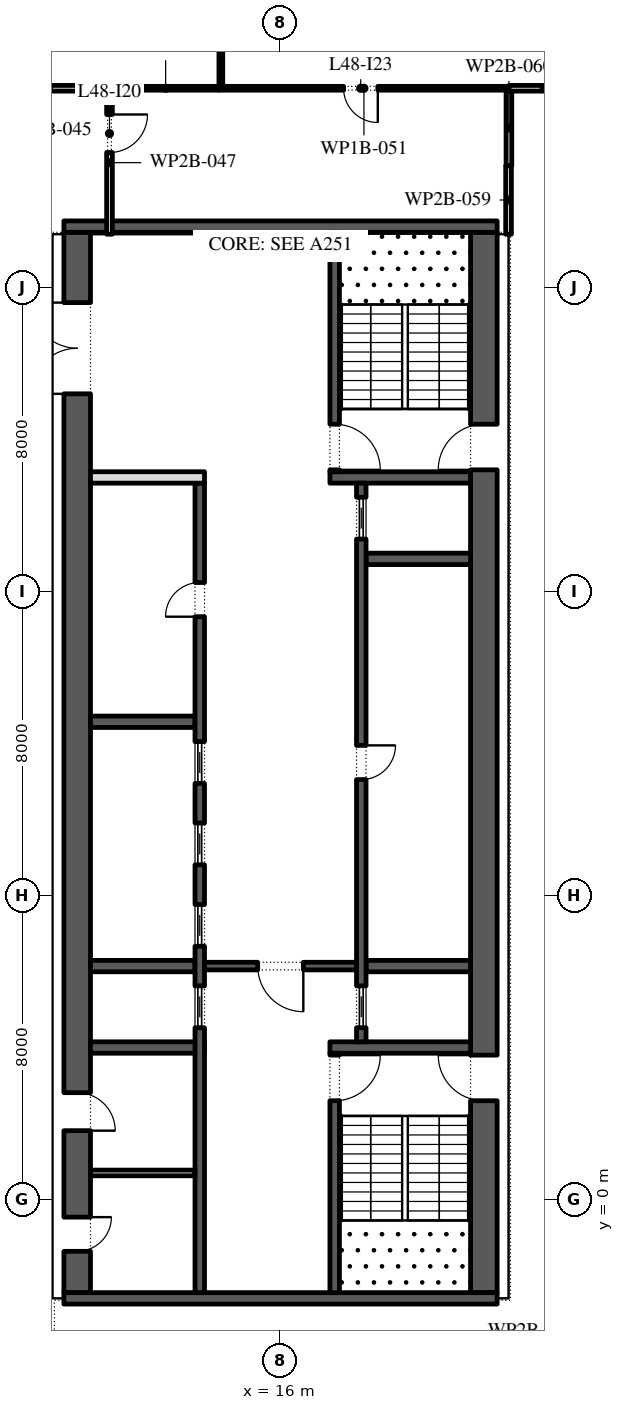
"""IFC4 building model, lengths in metres.
Left out: names, types, materials, properties, quantities, classifications, styles, units other than length and angle.
Written with IfcOpenShell. Run it as: python <this file> out.ifc"""

import sys

from ifc_helpers import new_model, si_unit, direction, frame, frame_2d, origin, place, context, subcontext, project, spatial, rectangle, extrude, element, fill, save


model = new_model("IFC4")
c1 = context("Model", 3, precision=1e-05, world=origin(), true_north=direction((0.0, 1.0)))
c2 = subcontext(c1, "Body", "Model", "MODEL_VIEW")
j1 = project(units=[si_unit("LENGTHUNIT", "METRE"), si_unit("PLANEANGLEUNIT", "RADIAN")], contexts=[c1])
p1 = place(None, origin())
s1 = spatial("IfcSite", under=j1, at=p1, CompositionType="ELEMENT")
p2 = place(p1, origin())
s2 = spatial("IfcBuilding", under=s1, at=p2, CompositionType="ELEMENT")
p3 = place(p2, frame((0.0, 0.0, 217.8)))
s3 = spatial("IfcBuildingStorey", under=s2, at=p3, CompositionType="ELEMENT", Elevation=217.8)
p4 = place(p3, frame((21.35, -2.45, 0.0), z_axis=(0.0, 0.0, 1.0), x_axis=(0.0, 1.0, 0.0)))
e1 = element("IfcWall", 1, at=p4, inside=s3, PredefinedType="SHEAR", context=c2, shape_type="SweptSolid", body=[
    extrude(rectangle(XDim=27.9, YDim=0.7, at=frame_2d((13.95, 0.0))), origin(), (0.0, 0.0, 1.0), 3.95),
])
p5 = place(p4, frame((5.05, 0.0, 0.0)))
e2 = element("IfcOpeningElement", 2, at=p5, cuts=e1, PredefinedType="OPENING", context=c2, shape_type="SweptSolid", body=[
    extrude(rectangle(XDim=1.2, YDim=2.1, at=frame_2d((0.6, 1.05))), frame((0.0, 0.36, 0.0), z_axis=(0.0, -1.0, 0.0), x_axis=(1.0, 0.0, 0.0)), (0.0, 0.0, 1.0), 0.72),
])
p6 = place(p4, frame((21.65, 0.0, 0.0)))
e3 = element("IfcOpeningElement", 3, at=p6, cuts=e1, PredefinedType="OPENING", context=c2, shape_type="SweptSolid", body=[
    extrude(rectangle(XDim=1.2, YDim=2.1, at=frame_2d((0.6, 1.05))), frame((0.0, 0.36, 0.0), z_axis=(0.0, -1.0, 0.0), x_axis=(1.0, 0.0, 0.0)), (0.0, 0.0, 1.0), 0.72),
])
p7 = place(p3, frame((10.65, -2.45, 0.0), z_axis=(0.0, 0.0, 1.0), x_axis=(0.0, 1.0, 0.0)))
e4 = element("IfcWall", 4, at=p7, inside=s3, PredefinedType="SHEAR", context=c2, shape_type="SweptSolid", body=[
    extrude(rectangle(XDim=27.9, YDim=0.7, at=frame_2d((13.95, 0.0))), origin(), (0.0, 0.0, 1.0), 3.95),
])
p8 = place(p7, frame((23.65, 0.0, 0.0)))
e5 = element("IfcOpeningElement", 5, at=p8, cuts=e4, PredefinedType="OPENING", context=c2, shape_type="SweptSolid", body=[
    extrude(rectangle(XDim=2.4, YDim=2.1, at=frame_2d((1.2, 1.05))), frame((0.0, 0.36, 0.0), z_axis=(0.0, -1.0, 0.0), x_axis=(1.0, 0.0, 0.0)), (0.0, 0.0, 1.0), 0.72),
])
p9 = place(p7, frame((1.087, 0.0, 0.0)))
e6 = element("IfcOpeningElement", 6, at=p9, cuts=e4, PredefinedType="OPENING", context=c2, shape_type="SweptSolid", body=[
    extrude(rectangle(XDim=0.9, YDim=2.1, at=frame_2d((0.45, 1.05))), frame((0.0, 0.36, 0.0), z_axis=(0.0, -1.0, 0.0), x_axis=(1.0, 0.0, 0.0)), (0.0, 0.0, 1.0), 0.72),
])
p10 = place(p7, frame((4.262, 0.0, 0.0)))
e7 = element("IfcOpeningElement", 7, at=p10, cuts=e4, PredefinedType="OPENING", context=c2, shape_type="SweptSolid", body=[
    extrude(rectangle(XDim=1.0, YDim=2.1, at=frame_2d((0.5, 1.05))), frame((0.0, 0.36, 0.0), z_axis=(0.0, -1.0, 0.0), x_axis=(1.0, 0.0, 0.0)), (0.0, 0.0, 1.0), 0.72),
])
for number, where, z_axis, x_axis in (
    (8, (10.3, -2.6, 0.0), (0.0, 0.0, 1.0), (1.0, 0.0, 0.0)),
    (9, (10.3, 25.6, 0.0), (0.0, 0.0, 1.0), (1.0, 0.0, 0.0)),
):
    element("IfcWall", number, at=place(p3, frame(where, z_axis=z_axis, x_axis=x_axis)), inside=s3, PredefinedType="SHEAR", context=c2, shape_type="SweptSolid", body=[
        extrude(rectangle(XDim=11.4, YDim=0.3, at=frame_2d((5.7, 0.0))), origin(), (0.0, 0.0, 1.0), 3.95),
    ])
p11 = place(p3, frame((17.3, 4.0, 0.0), z_axis=(0.0, 0.0, 1.0), x_axis=(1.0, 0.0, 0.0)))
e10 = element("IfcWall", 10, at=p11, inside=s3, PredefinedType="SHEAR", context=c2, shape_type="SweptSolid", body=[
    extrude(rectangle(XDim=3.7, YDim=0.3, at=frame_2d((1.85, 0.0))), origin(), (0.0, 0.0, 1.0), 3.95),
])
p12 = place(p3, frame((17.425, -2.45, 0.0), z_axis=(0.0, 0.0, 1.0), x_axis=(0.0, 1.0, 0.0)))
e11 = element("IfcWall", 11, at=p12, inside=s3, PredefinedType="SHEAR", context=c2, shape_type="SweptSolid", body=[
    extrude(rectangle(XDim=6.3, YDim=0.25, at=frame_2d((3.15, 0.0))), origin(), (0.0, 0.0, 1.0), 3.95),
])
p13 = place(p12, frame((5.05, 0.0, 0.0)))
e12 = element("IfcOpeningElement", 12, at=p13, cuts=e11, PredefinedType="OPENING", context=c2, shape_type="SweptSolid", body=[
    extrude(rectangle(XDim=1.2, YDim=2.1, at=frame_2d((0.6, 1.05))), frame((0.0, 0.135, 0.0), z_axis=(0.0, -1.0, 0.0), x_axis=(1.0, 0.0, 0.0)), (0.0, 0.0, 1.0), 0.27),
])
p14 = place(p3, frame((17.3, 19.0, 0.0), z_axis=(0.0, 0.0, 1.0), x_axis=(1.0, 0.0, 0.0)))
e13 = element("IfcWall", 13, at=p14, inside=s3, PredefinedType="SHEAR", context=c2, shape_type="SweptSolid", body=[
    extrude(rectangle(XDim=3.7, YDim=0.3, at=frame_2d((1.85, 0.0))), origin(), (0.0, 0.0, 1.0), 3.95),
])
p15 = place(p3, frame((17.425, 19.15, 0.0), z_axis=(0.0, 0.0, 1.0), x_axis=(0.0, 1.0, 0.0)))
e14 = element("IfcWall", 14, at=p15, inside=s3, PredefinedType="SHEAR", context=c2, shape_type="SweptSolid", body=[
    extrude(rectangle(XDim=6.3, YDim=0.25, at=frame_2d((3.15, 0.0))), origin(), (0.0, 0.0, 1.0), 3.95),
])
p16 = place(p15, frame((0.05, 0.0, 0.0)))
e15 = element("IfcOpeningElement", 15, at=p16, cuts=e14, PredefinedType="OPENING", context=c2, shape_type="SweptSolid", body=[
    extrude(rectangle(XDim=1.2, YDim=2.1, at=frame_2d((0.6, 1.05))), frame((0.0, 0.135, 0.0), z_axis=(0.0, -1.0, 0.0), x_axis=(1.0, 0.0, 0.0)), (0.0, 0.0, 1.0), 0.27),
])
for number, where, z_axis, x_axis in (
    (16, (18.25, 6.143, 0.0), (0.0, 0.0, 1.0), (1.0, 0.0, 0.0)),
    (17, (18.25, 16.857, 0.0), (0.0, 0.0, 1.0), (1.0, 0.0, 0.0)),
):
    element("IfcWall", number, at=place(p3, frame(where, z_axis=z_axis, x_axis=x_axis)), inside=s3, PredefinedType="SHEAR", context=c2, shape_type="SweptSolid", body=[
        extrude(rectangle(XDim=2.75, YDim=0.3, at=frame_2d((1.375, 0.0))), origin(), (0.0, 0.0, 1.0), 3.95),
    ])
p17 = place(p3, frame((18.125, 4.15, 0.0), z_axis=(0.0, 0.0, 1.0), x_axis=(0.0, 1.0, 0.0)))
e18 = element("IfcWall", 18, at=p17, inside=s3, PredefinedType="SHEAR", context=c2, shape_type="SweptSolid", body=[
    extrude(rectangle(XDim=14.7, YDim=0.25, at=frame_2d((7.35, 0.0))), origin(), (0.0, 0.0, 1.0), 3.95),
])
p18 = place(p17, frame((6.9, 0.0, 0.0)))
e19 = element("IfcOpeningElement", 19, at=p18, cuts=e18, PredefinedType="OPENING", context=c2, shape_type="SweptSolid", body=[
    extrude(rectangle(XDim=0.9, YDim=2.1, at=frame_2d((0.45, 1.05))), frame((0.0, 0.135, 0.0), z_axis=(0.0, -1.0, 0.0), x_axis=(1.0, 0.0, 0.0)), (0.0, 0.0, 1.0), 0.27),
])
p19 = place(p17, frame((0.371, 0.0, 0.0)))
e20 = element("IfcOpeningElement", 20, at=p19, cuts=e18, PredefinedType="OPENING", context=c2, shape_type="SweptSolid", body=[
    extrude(rectangle(XDim=1.1, YDim=2.1, at=frame_2d((0.55, 1.05))), frame((0.0, 0.135, 0.0), z_axis=(0.0, -1.0, 0.0), x_axis=(1.0, 0.0, 0.0)), (0.0, 0.0, 1.0), 0.27),
])
p20 = place(p17, frame((13.229, 0.0, 0.0)))
e21 = element("IfcOpeningElement", 21, at=p20, cuts=e18, PredefinedType="OPENING", context=c2, shape_type="SweptSolid", body=[
    extrude(rectangle(XDim=1.1, YDim=2.1, at=frame_2d((0.55, 1.05))), frame((0.0, 0.135, 0.0), z_axis=(0.0, -1.0, 0.0), x_axis=(1.0, 0.0, 0.0)), (0.0, 0.0, 1.0), 0.27),
])
p21 = place(p3, frame((11.0, 4.0, 0.0), z_axis=(0.0, 0.0, 1.0), x_axis=(1.0, 0.0, 0.0)))
e22 = element("IfcWall", 22, at=p21, inside=s3, PredefinedType="SHEAR", context=c2, shape_type="SweptSolid", body=[
    extrude(rectangle(XDim=3.0, YDim=0.3, at=frame_2d((1.5, 0.0))), origin(), (0.0, 0.0, 1.0), 3.95),
])
for number, where, z_axis, x_axis in (
    (23, (11.0, 6.143, 0.0), (0.0, 0.0, 1.0), (1.0, 0.0, 0.0)),
    (24, (11.0, 12.571, 0.0), (0.0, 0.0, 1.0), (1.0, 0.0, 0.0)),
):
    element("IfcWall", number, at=place(p3, frame(where, z_axis=z_axis, x_axis=x_axis)), inside=s3, PredefinedType="SHEAR", context=c2, shape_type="SweptSolid", body=[
        extrude(rectangle(XDim=2.75, YDim=0.3, at=frame_2d((1.375, 0.0))), origin(), (0.0, 0.0, 1.0), 3.95),
    ])
p22 = place(p3, frame((13.875, -2.45, 0.0), z_axis=(0.0, 0.0, 1.0), x_axis=(0.0, 1.0, 0.0)))
e25 = element("IfcWall", 25, at=p22, inside=s3, PredefinedType="SHEAR", context=c2, shape_type="SweptSolid", body=[
    extrude(rectangle(XDim=21.3, YDim=0.25, at=frame_2d((10.65, 0.0))), origin(), (0.0, 0.0, 1.0), 3.95),
])
p23 = place(p22, frame((17.786, 0.0, 0.0)))
e26 = element("IfcOpeningElement", 26, at=p23, cuts=e25, PredefinedType="OPENING", context=c2, shape_type="SweptSolid", body=[
    extrude(rectangle(XDim=0.9, YDim=2.1, at=frame_2d((0.45, 1.05))), frame((0.0, 0.135, 0.0), z_axis=(0.0, -1.0, 0.0), x_axis=(1.0, 0.0, 0.0)), (0.0, 0.0, 1.0), 0.27),
])
p24 = place(p22, frame((6.971, 0.0, 0.0)))
e27 = element("IfcOpeningElement", 27, at=p24, cuts=e25, PredefinedType="OPENING", context=c2, shape_type="SweptSolid", body=[
    extrude(rectangle(XDim=1.1, YDim=2.1, at=frame_2d((0.55, 1.05))), frame((0.0, 0.135, 0.0), z_axis=(0.0, -1.0, 0.0), x_axis=(1.0, 0.0, 0.0)), (0.0, 0.0, 1.0), 0.27),
])
p25 = place(p22, frame((9.114, 0.0, 0.0)))
e28 = element("IfcOpeningElement", 28, at=p25, cuts=e25, PredefinedType="OPENING", context=c2, shape_type="SweptSolid", body=[
    extrude(rectangle(XDim=1.1, YDim=2.1, at=frame_2d((0.55, 1.05))), frame((0.0, 0.135, 0.0), z_axis=(0.0, -1.0, 0.0), x_axis=(1.0, 0.0, 0.0)), (0.0, 0.0, 1.0), 0.27),
])
p26 = place(p22, frame((11.257, 0.0, 0.0)))
e29 = element("IfcOpeningElement", 29, at=p26, cuts=e25, PredefinedType="OPENING", context=c2, shape_type="SweptSolid", body=[
    extrude(rectangle(XDim=1.1, YDim=2.1, at=frame_2d((0.55, 1.05))), frame((0.0, 0.135, 0.0), z_axis=(0.0, -1.0, 0.0), x_axis=(1.0, 0.0, 0.0)), (0.0, 0.0, 1.0), 0.27),
])
p27 = place(p22, frame((13.4, 0.0, 0.0)))
e30 = element("IfcOpeningElement", 30, at=p27, cuts=e25, PredefinedType="OPENING", context=c2, shape_type="SweptSolid", body=[
    extrude(rectangle(XDim=1.1, YDim=2.1, at=frame_2d((0.55, 1.05))), frame((0.0, 0.135, 0.0), z_axis=(0.0, -1.0, 0.0), x_axis=(1.0, 0.0, 0.0)), (0.0, 0.0, 1.0), 0.27),
])
p28 = place(p3, frame((11.0, 19.0, 0.0), z_axis=(0.0, 0.0, 1.0), x_axis=(1.0, 0.0, 0.0)))
e31 = element("IfcWall", 31, at=p28, inside=s3, PredefinedType="PARTITIONING", context=c2, shape_type="SweptSolid", body=[
    extrude(rectangle(XDim=3.0, YDim=0.3, at=frame_2d((1.5, 0.0))), origin(), (0.0, 0.0, 1.0), 3.95),
])
p29 = place(p3, frame((14.0, 6.143, 0.0), z_axis=(0.0, 0.0, 1.0), x_axis=(1.0, 0.0, 0.0)))
e32 = element("IfcWall", 32, at=p29, inside=s3, PredefinedType="SHEAR", context=c2, shape_type="SweptSolid", body=[
    extrude(rectangle(XDim=4.0, YDim=0.2, at=frame_2d((2.0, 0.0))), origin(), (0.0, 0.0, 1.0), 3.95),
])
p30 = place(p29, frame((1.4, 0.0, 0.0)))
e33 = element("IfcOpeningElement", 33, at=p30, cuts=e32, PredefinedType="OPENING", context=c2, shape_type="SweptSolid", body=[
    extrude(rectangle(XDim=1.2, YDim=2.1, at=frame_2d((0.6, 1.05))), frame((0.0, 0.11, 0.0), z_axis=(0.0, -1.0, 0.0), x_axis=(1.0, 0.0, 0.0)), (0.0, 0.0, 1.0), 0.22),
])
p31 = place(p3, frame((11.0, 0.7, 0.0), z_axis=(0.0, 0.0, 1.0), x_axis=(1.0, 0.0, 0.0)))
e34 = element("IfcWall", 34, at=p31, inside=s3, PredefinedType="PARTITIONING", context=c2, shape_type="SweptSolid", body=[
    extrude(rectangle(XDim=2.75, YDim=0.15, at=frame_2d((1.375, 0.0))), origin(), (0.0, 0.0, 1.0), 3.95),
])
p32 = place(p3, frame((8.21, 29.24, 0.0), z_axis=(0.0, 0.0, 1.0), x_axis=(1.0, 0.0, 0.0)))
e35 = element("IfcWall", 35, at=p32, inside=s3, PredefinedType="PARTITIONING", context=c2, shape_type="SweptSolid", body=[
    extrude(rectangle(XDim=3.365, YDim=0.15, at=frame_2d((1.683, 0.0))), origin(), (0.0, 0.0, 1.0), 3.95),
])
p33 = place(p3, frame((11.5, 29.165, 0.0), z_axis=(0.0, 0.0, 1.0), x_axis=(0.0, -1.0, 0.0)))
e36 = element("IfcWall", 36, at=p33, inside=s3, PredefinedType="PARTITIONING", context=c2, shape_type="SweptSolid", body=[
    extrude(rectangle(XDim=3.765, YDim=0.15, at=frame_2d((1.883, 0.0))), origin(), (0.0, 0.0, 1.0), 3.95),
])
p34 = place(p33, frame((0.615, 0.0, 0.0)))
e37 = element("IfcOpeningElement", 37, at=p34, cuts=e36, PredefinedType="OPENING", context=c2, shape_type="SweptSolid", body=[
    extrude(rectangle(XDim=1.0, YDim=2.1, at=frame_2d((0.5, 1.05))), frame((0.0, 0.085, 0.0), z_axis=(0.0, -1.0, 0.0), x_axis=(1.0, 0.0, 0.0)), (0.0, 0.0, 1.0), 0.17),
])
p35 = place(p3, frame((11.575, 29.24, 0.0), z_axis=(0.0, 0.0, 1.0), x_axis=(1.0, 0.0, 0.0)))
e38 = element("IfcWall", 38, at=p35, inside=s3, PredefinedType="PARTITIONING", context=c2, shape_type="SweptSolid", body=[
    extrude(rectangle(XDim=2.805, YDim=0.1, at=frame_2d((1.402, 0.0))), origin(), (0.0, 0.0, 1.0), 3.95),
])
p36 = place(p3, frame((14.38, 29.24, 0.0), z_axis=(0.0, 0.0, 1.0), x_axis=(1.0, 0.0, 0.0)))
e39 = element("IfcWall", 39, at=p36, inside=s3, PredefinedType="PARTITIONING", context=c2, shape_type="SweptSolid", body=[
    extrude(rectangle(XDim=7.63, YDim=0.1, at=frame_2d((3.815, 0.0))), origin(), (0.0, 0.0, 1.0), 3.95),
])
p37 = place(p36, frame((3.28, 0.0, 0.0)))
e40 = element("IfcOpeningElement", 40, at=p37, cuts=e39, PredefinedType="OPENING", context=c2, shape_type="SweptSolid", body=[
    extrude(rectangle(XDim=0.9, YDim=2.1, at=frame_2d((0.45, 1.05))), frame((0.0, 0.06, 0.0), z_axis=(0.0, -1.0, 0.0), x_axis=(1.0, 0.0, 0.0)), (0.0, 0.0, 1.0), 0.12),
])
p38 = place(p3, frame((14.43, 36.22, 0.0), z_axis=(0.0, 0.0, 1.0), x_axis=(0.0, -1.0, 0.0)))
e41 = element("IfcWall", 41, at=p38, inside=s3, PredefinedType="PARTITIONING", context=c2, shape_type="SweptSolid", body=[
    extrude(rectangle(XDim=6.93, YDim=0.1, at=frame_2d((3.465, 0.0))), origin(), (0.0, 0.0, 1.0), 3.95),
])
p39 = place(p3, frame((22.0, 25.4, 0.0), z_axis=(0.0, 0.0, 1.0), x_axis=(0.0, 1.0, 0.0)))
e42 = element("IfcWall", 42, at=p39, inside=s3, PredefinedType="PARTITIONING", context=c2, shape_type="SweptSolid", body=[
    extrude(rectangle(XDim=1.8, YDim=0.15, at=frame_2d((0.9, 0.0))), origin(), (0.0, 0.0, 1.0), 3.95),
])
p40 = place(p3, frame((22.01, 27.2, 0.0), z_axis=(0.0, 0.0, 1.0), x_axis=(0.0, 1.0, 0.0)))
e43 = element("IfcWall", 43, at=p40, inside=s3, PredefinedType="PARTITIONING", context=c2, shape_type="SweptSolid", body=[
    extrude(rectangle(XDim=1.99, YDim=0.15, at=frame_2d((0.995, 0.0))), origin(), (0.0, 0.0, 1.0), 3.95),
])
p41 = place(p3, frame((22.01, 29.24, 0.0), z_axis=(0.0, 0.0, 1.0), x_axis=(1.0, 0.0, 0.0)))
e44 = element("IfcWall", 44, at=p41, inside=s3, PredefinedType="PARTITIONING", context=c2, shape_type="SweptSolid", body=[
    extrude(rectangle(XDim=1.855, YDim=0.15, at=frame_2d((0.927, 0.0))), origin(), (0.0, 0.0, 1.0), 3.95),
])
p42 = place(p18, frame((0.9, -0.2, 0.0), z_axis=(0.0, 0.0, 1.0), x_axis=(-1.0, 0.0, 0.0)))
e45 = element("IfcDoor", 45, at=p42, inside=s3, OperationType="SINGLE_SWING_RIGHT", PredefinedType="DOOR", context=c2, shape_type="SweptSolid", body=[
    extrude(rectangle(XDim=0.9, YDim=2.1, at=frame_2d((0.45, 1.05))), frame((0.0, -0.075, 0.0), z_axis=(0.0, -1.0, 0.0), x_axis=(1.0, 0.0, 0.0)), (0.0, 0.0, 1.0), 0.05),
])
fill(e19, e45)
p43 = place(p19, origin())
e46 = element("IfcDoor", 46, at=p43, inside=s3, OperationType="SLIDING_TO_LEFT", PredefinedType="DOOR", context=c2, shape_type="SweptSolid", body=[
    extrude(rectangle(XDim=1.1, YDim=2.1, at=frame_2d((0.55, 1.05))), frame((0.0, 0.025, 0.0), z_axis=(0.0, -1.0, 0.0), x_axis=(1.0, 0.0, 0.0)), (0.0, 0.0, 1.0), 0.05),
])
fill(e20, e46)
p44 = place(p20, origin())
e47 = element("IfcDoor", 47, at=p44, inside=s3, OperationType="SLIDING_TO_LEFT", PredefinedType="DOOR", context=c2, shape_type="SweptSolid", body=[
    extrude(rectangle(XDim=1.1, YDim=2.1, at=frame_2d((0.55, 1.05))), frame((0.0, 0.025, 0.0), z_axis=(0.0, -1.0, 0.0), x_axis=(1.0, 0.0, 0.0)), (0.0, 0.0, 1.0), 0.05),
])
fill(e21, e47)
p45 = place(p23, origin())
e48 = element("IfcDoor", 48, at=p45, inside=s3, OperationType="SINGLE_SWING_RIGHT", PredefinedType="DOOR", context=c2, shape_type="SweptSolid", body=[
    extrude(rectangle(XDim=0.9, YDim=2.1, at=frame_2d((0.45, 1.05))), frame((0.0, 0.125, 0.0), z_axis=(0.0, -1.0, 0.0), x_axis=(1.0, 0.0, 0.0)), (0.0, 0.0, 1.0), 0.05),
])
fill(e26, e48)
p46 = place(p24, origin())
e49 = element("IfcDoor", 49, at=p46, inside=s3, OperationType="SLIDING_TO_LEFT", PredefinedType="DOOR", context=c2, shape_type="SweptSolid", body=[
    extrude(rectangle(XDim=1.1, YDim=2.1, at=frame_2d((0.55, 1.05))), frame((0.0, 0.025, 0.0), z_axis=(0.0, -1.0, 0.0), x_axis=(1.0, 0.0, 0.0)), (0.0, 0.0, 1.0), 0.05),
])
fill(e27, e49)
p47 = place(p25, origin())
e50 = element("IfcDoor", 50, at=p47, inside=s3, OperationType="SLIDING_TO_LEFT", PredefinedType="DOOR", context=c2, shape_type="SweptSolid", body=[
    extrude(rectangle(XDim=1.1, YDim=2.1, at=frame_2d((0.55, 1.05))), frame((0.0, 0.025, 0.0), z_axis=(0.0, -1.0, 0.0), x_axis=(1.0, 0.0, 0.0)), (0.0, 0.0, 1.0), 0.05),
])
fill(e28, e50)
p48 = place(p26, origin())
e51 = element("IfcDoor", 51, at=p48, inside=s3, OperationType="SLIDING_TO_LEFT", PredefinedType="DOOR", context=c2, shape_type="SweptSolid", body=[
    extrude(rectangle(XDim=1.1, YDim=2.1, at=frame_2d((0.55, 1.05))), frame((0.0, 0.025, 0.0), z_axis=(0.0, -1.0, 0.0), x_axis=(1.0, 0.0, 0.0)), (0.0, 0.0, 1.0), 0.05),
])
fill(e29, e51)
p49 = place(p27, origin())
e52 = element("IfcDoor", 52, at=p49, inside=s3, OperationType="SLIDING_TO_LEFT", PredefinedType="DOOR", context=c2, shape_type="SweptSolid", body=[
    extrude(rectangle(XDim=1.1, YDim=2.1, at=frame_2d((0.55, 1.05))), frame((0.0, 0.025, 0.0), z_axis=(0.0, -1.0, 0.0), x_axis=(1.0, 0.0, 0.0)), (0.0, 0.0, 1.0), 0.05),
])
fill(e30, e52)
p50 = place(p30, frame((1.2, 0.0, 0.0), z_axis=(0.0, 0.0, 1.0), x_axis=(-1.0, 0.0, 0.0)))
e53 = element("IfcDoor", 53, at=p50, inside=s3, OperationType="SINGLE_SWING_RIGHT", PredefinedType="DOOR", context=c2, shape_type="SweptSolid", body=[
    extrude(rectangle(XDim=1.2, YDim=2.1, at=frame_2d((0.6, 1.05))), frame((0.0, 0.025, 0.0), z_axis=(0.0, -1.0, 0.0), x_axis=(1.0, 0.0, 0.0)), (0.0, 0.0, 1.0), 0.05),
])
fill(e33, e53)
p51 = place(p8, origin())
e54 = element("IfcDoor", 54, at=p51, inside=s3, OperationType="DOUBLE_DOOR_SINGLE_SWING", PredefinedType="DOOR", context=c2, shape_type="SweptSolid", body=[
    extrude(rectangle(XDim=2.4, YDim=2.1, at=frame_2d((1.2, 1.05))), frame((0.0, 0.025, 0.0), z_axis=(0.0, -1.0, 0.0), x_axis=(1.0, 0.0, 0.0)), (0.0, 0.0, 1.0), 0.05),
])
fill(e5, e54)
p52 = place(p13, frame((1.2, 0.0, 0.0), z_axis=(0.0, 0.0, 1.0), x_axis=(-1.0, 0.0, 0.0)))
e55 = element("IfcDoor", 55, at=p52, inside=s3, OperationType="SINGLE_SWING_RIGHT", PredefinedType="DOOR", context=c2, shape_type="SweptSolid", body=[
    extrude(rectangle(XDim=1.2, YDim=2.1, at=frame_2d((0.6, 1.05))), frame((0.0, 0.025, 0.0), z_axis=(0.0, -1.0, 0.0), x_axis=(1.0, 0.0, 0.0)), (0.0, 0.0, 1.0), 0.05),
])
fill(e12, e55)
p53 = place(p5, origin())
e56 = element("IfcDoor", 56, at=p53, inside=s3, OperationType="SINGLE_SWING_LEFT", PredefinedType="DOOR", context=c2, shape_type="SweptSolid", body=[
    extrude(rectangle(XDim=1.2, YDim=2.1, at=frame_2d((0.6, 1.05))), frame((0.0, 0.025, 0.0), z_axis=(0.0, -1.0, 0.0), x_axis=(1.0, 0.0, 0.0)), (0.0, 0.0, 1.0), 0.05),
])
fill(e2, e56)
p54 = place(p16, frame((1.2, 0.0, 0.0), z_axis=(0.0, 0.0, 1.0), x_axis=(-1.0, 0.0, 0.0)))
e57 = element("IfcDoor", 57, at=p54, inside=s3, OperationType="SINGLE_SWING_LEFT", PredefinedType="DOOR", context=c2, shape_type="SweptSolid", body=[
    extrude(rectangle(XDim=1.2, YDim=2.1, at=frame_2d((0.6, 1.05))), frame((0.0, 0.025, 0.0), z_axis=(0.0, -1.0, 0.0), x_axis=(1.0, 0.0, 0.0)), (0.0, 0.0, 1.0), 0.05),
])
fill(e15, e57)
p55 = place(p6, origin())
e58 = element("IfcDoor", 58, at=p55, inside=s3, OperationType="SINGLE_SWING_RIGHT", PredefinedType="DOOR", context=c2, shape_type="SweptSolid", body=[
    extrude(rectangle(XDim=1.2, YDim=2.1, at=frame_2d((0.6, 1.05))), frame((0.0, 0.025, 0.0), z_axis=(0.0, -1.0, 0.0), x_axis=(1.0, 0.0, 0.0)), (0.0, 0.0, 1.0), 0.05),
])
fill(e3, e58)
p56 = place(p9, frame((0.9, -0.65, 0.0), z_axis=(0.0, 0.0, 1.0), x_axis=(-1.0, 0.0, 0.0)))
e59 = element("IfcDoor", 59, at=p56, inside=s3, OperationType="SINGLE_SWING_RIGHT", PredefinedType="DOOR", context=c2, shape_type="SweptSolid", body=[
    extrude(rectangle(XDim=0.9, YDim=2.1, at=frame_2d((0.45, 1.05))), frame((0.0, -0.3, 0.0), z_axis=(0.0, -1.0, 0.0), x_axis=(1.0, 0.0, 0.0)), (0.0, 0.0, 1.0), 0.05),
])
fill(e6, e59)
p57 = place(p10, frame((1.0, -0.65, 0.0), z_axis=(0.0, 0.0, 1.0), x_axis=(-1.0, 0.0, 0.0)))
e60 = element("IfcDoor", 60, at=p57, inside=s3, OperationType="SINGLE_SWING_LEFT", PredefinedType="DOOR", context=c2, shape_type="SweptSolid", body=[
    extrude(rectangle(XDim=1.0, YDim=2.1, at=frame_2d((0.5, 1.05))), frame((0.0, -0.3, 0.0), z_axis=(0.0, -1.0, 0.0), x_axis=(1.0, 0.0, 0.0)), (0.0, 0.0, 1.0), 0.05),
])
fill(e7, e60)
p58 = place(p34, origin())
e61 = element("IfcDoor", 61, at=p58, inside=s3, OperationType="SINGLE_SWING_RIGHT", PredefinedType="DOOR", context=c2, shape_type="SweptSolid", body=[
    extrude(rectangle(XDim=1.0, YDim=2.1, at=frame_2d((0.5, 1.05))), frame((0.0, 0.025, 0.0), z_axis=(0.0, -1.0, 0.0), x_axis=(1.0, 0.0, 0.0)), (0.0, 0.0, 1.0), 0.05),
])
fill(e37, e61)
p59 = place(p37, frame((0.9, 0.0, 0.0), z_axis=(0.0, 0.0, 1.0), x_axis=(-1.0, 0.0, 0.0)))
e62 = element("IfcDoor", 62, at=p59, inside=s3, OperationType="SINGLE_SWING_RIGHT", PredefinedType="DOOR", context=c2, shape_type="SweptSolid", body=[
    extrude(rectangle(XDim=0.9, YDim=2.1, at=frame_2d((0.45, 1.05))), frame((0.0, 0.025, 0.0), z_axis=(0.0, -1.0, 0.0), x_axis=(1.0, 0.0, 0.0)), (0.0, 0.0, 1.0), 0.05),
])
fill(e40, e62)
save(model, sys.argv[1])
